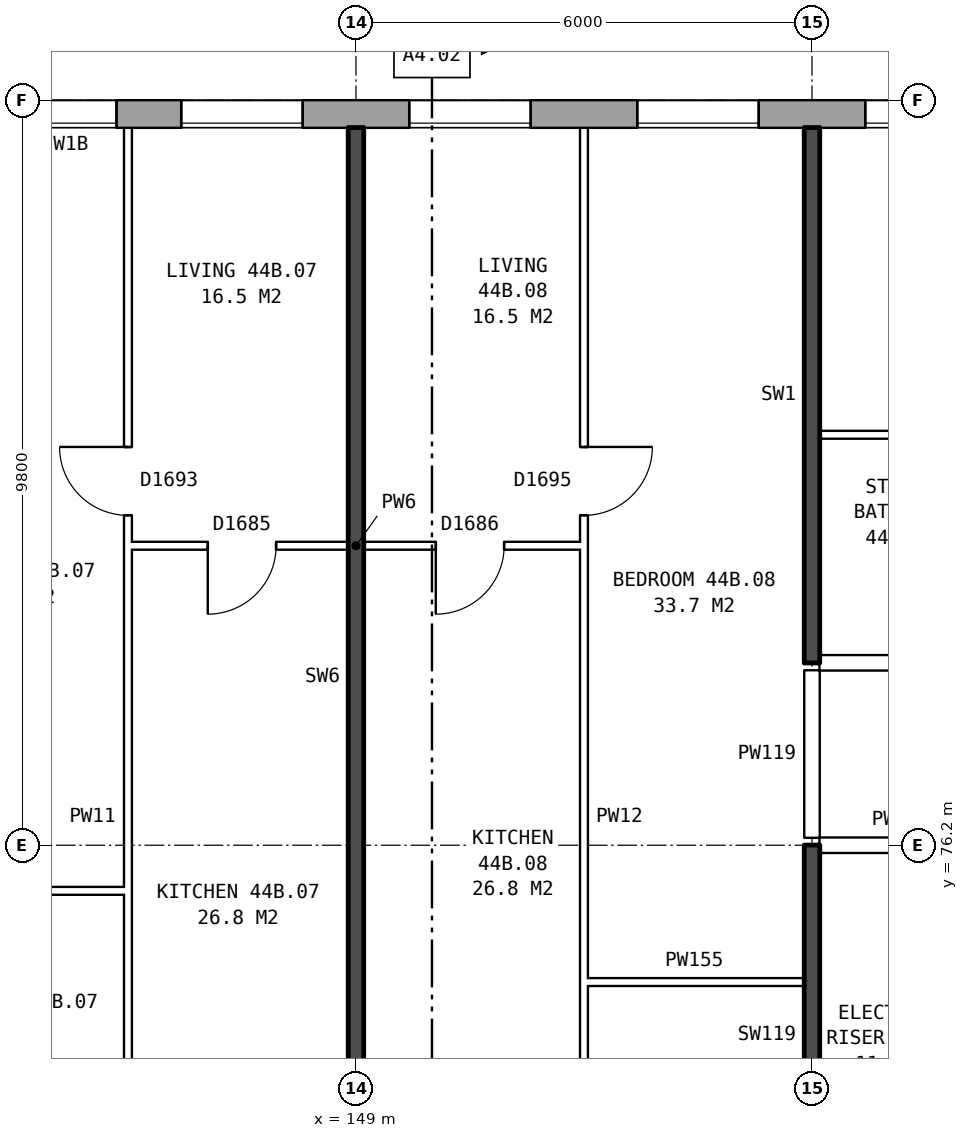
"""IFC4 building model, lengths in metres.
Left out: names, types, materials, properties, quantities, classifications, styles, units other than length and angle.
Written with IfcOpenShell. Run it as: python <this file> out.ifc"""

import sys

from ifc_helpers import new_model, si_unit, direction, frame, frame_2d, origin, place, context, subcontext, project, spatial, rectangle, extrude, element, fill, save


model = new_model("IFC4")
c1 = context("Model", 3, precision=1e-05, world=origin(), true_north=direction((0.0, 1.0)))
c2 = subcontext(c1, "Body", "Model", "MODEL_VIEW")
j1 = project(units=[si_unit("LENGTHUNIT", "METRE"), si_unit("PLANEANGLEUNIT", "RADIAN")], contexts=[c1])
p1 = place(None, origin())
s1 = spatial("IfcSite", under=j1, at=p1, CompositionType="ELEMENT")
p2 = place(p1, origin())
s2 = spatial("IfcBuilding", under=s1, at=p2, CompositionType="ELEMENT")
p3 = place(p2, frame((0.0, 0.0, 157.8)))
s3 = spatial("IfcBuildingStorey", under=s2, at=p3, CompositionType="ELEMENT", Elevation=157.8)
p4 = place(p3, frame((168.425, 85.82, 0.0), z_axis=(0.0, 0.0, 1.0), x_axis=(-1.0, 0.0, 0.0)))
e1 = element("IfcWall", 1, at=p4, inside=s3, PredefinedType="STANDARD", context=c2, shape_type="SweptSolid", body=[
    extrude(rectangle(XDim=34.351, YDim=0.36, at=frame_2d((17.175, 0.0))), origin(), (0.0, 0.0, 1.0), 2.85),
])
p5 = place(p4, frame((2.125, 0.0, 0.8)))
e2 = element("IfcOpeningElement", 2, at=p5, cuts=e1, PredefinedType="OPENING", context=c2, shape_type="SweptSolid", body=[
    extrude(rectangle(XDim=1.6, YDim=1.8, at=frame_2d((0.8, 0.9))), frame((0.0, 0.19, 0.0), z_axis=(0.0, -1.0, 0.0), x_axis=(1.0, 0.0, 0.0)), (0.0, 0.0, 1.0), 0.38),
])
p6 = place(p4, frame((5.125, 0.0, 0.8)))
e3 = element("IfcOpeningElement", 3, at=p6, cuts=e1, PredefinedType="OPENING", context=c2, shape_type="SweptSolid", body=[
    extrude(rectangle(XDim=1.6, YDim=1.8, at=frame_2d((0.8, 0.9))), frame((0.0, 0.19, 0.0), z_axis=(0.0, -1.0, 0.0), x_axis=(1.0, 0.0, 0.0)), (0.0, 0.0, 1.0), 0.38),
])
p7 = place(p4, frame((7.625, 0.0, 1.7)))
e4 = element("IfcOpeningElement", 4, at=p7, cuts=e1, PredefinedType="OPENING", context=c2, shape_type="SweptSolid", body=[
    extrude(rectangle(XDim=1.2, YDim=0.9, at=frame_2d((0.6, 0.45))), frame((0.0, 0.19, 0.0), z_axis=(0.0, -1.0, 0.0), x_axis=(1.0, 0.0, 0.0)), (0.0, 0.0, 1.0), 0.38),
])
p8 = place(p4, frame((11.125, 0.0, 0.8)))
e5 = element("IfcOpeningElement", 5, at=p8, cuts=e1, PredefinedType="OPENING", context=c2, shape_type="SweptSolid", body=[
    extrude(rectangle(XDim=1.6, YDim=1.8, at=frame_2d((0.8, 0.9))), frame((0.0, 0.19, 0.0), z_axis=(0.0, -1.0, 0.0), x_axis=(1.0, 0.0, 0.0)), (0.0, 0.0, 1.0), 0.38),
])
p9 = place(p4, frame((14.125, 0.0, 0.8)))
e6 = element("IfcOpeningElement", 6, at=p9, cuts=e1, PredefinedType="OPENING", context=c2, shape_type="SweptSolid", body=[
    extrude(rectangle(XDim=1.6, YDim=1.8, at=frame_2d((0.8, 0.9))), frame((0.0, 0.19, 0.0), z_axis=(0.0, -1.0, 0.0), x_axis=(1.0, 0.0, 0.0)), (0.0, 0.0, 1.0), 0.38),
])
p10 = place(p4, frame((17.125, 0.0, 0.8)))
e7 = element("IfcOpeningElement", 7, at=p10, cuts=e1, PredefinedType="OPENING", context=c2, shape_type="SweptSolid", body=[
    extrude(rectangle(XDim=1.6, YDim=1.8, at=frame_2d((0.8, 0.9))), frame((0.0, 0.19, 0.0), z_axis=(0.0, -1.0, 0.0), x_axis=(1.0, 0.0, 0.0)), (0.0, 0.0, 1.0), 0.38),
])
p11 = place(p4, frame((20.125, 0.0, 0.8)))
e8 = element("IfcOpeningElement", 8, at=p11, cuts=e1, PredefinedType="OPENING", context=c2, shape_type="SweptSolid", body=[
    extrude(rectangle(XDim=1.6, YDim=1.8, at=frame_2d((0.8, 0.9))), frame((0.0, 0.19, 0.0), z_axis=(0.0, -1.0, 0.0), x_axis=(1.0, 0.0, 0.0)), (0.0, 0.0, 1.0), 0.38),
])
p12 = place(p4, frame((22.575, 0.0, 0.45)))
e9 = element("IfcOpeningElement", 9, at=p12, cuts=e1, PredefinedType="OPENING", context=c2, shape_type="SweptSolid", body=[
    extrude(rectangle(XDim=1.2, YDim=1.8, at=frame_2d((0.6, 0.9))), frame((0.0, 0.19, 0.0), z_axis=(0.0, -1.0, 0.0), x_axis=(1.0, 0.0, 0.0)), (0.0, 0.0, 1.0), 0.38),
])
p13 = place(p4, frame((25.875, 0.0, 1.4)))
e10 = element("IfcOpeningElement", 10, at=p13, cuts=e1, PredefinedType="OPENING", context=c2, shape_type="SweptSolid", body=[
    extrude(rectangle(XDim=1.0, YDim=1.2, at=frame_2d((0.5, 0.6))), frame((0.0, 0.19, 0.0), z_axis=(0.0, -1.0, 0.0), x_axis=(1.0, 0.0, 0.0)), (0.0, 0.0, 1.0), 0.38),
])
p14 = place(p4, frame((29.125, 0.0, 0.8)))
e11 = element("IfcOpeningElement", 11, at=p14, cuts=e1, PredefinedType="OPENING", context=c2, shape_type="SweptSolid", body=[
    extrude(rectangle(XDim=1.6, YDim=1.8, at=frame_2d((0.8, 0.9))), frame((0.0, 0.19, 0.0), z_axis=(0.0, -1.0, 0.0), x_axis=(1.0, 0.0, 0.0)), (0.0, 0.0, 1.0), 0.38),
])
p15 = place(p4, frame((32.125, 0.0, 0.8)))
e12 = element("IfcOpeningElement", 12, at=p15, cuts=e1, PredefinedType="OPENING", context=c2, shape_type="SweptSolid", body=[
    extrude(rectangle(XDim=1.6, YDim=1.8, at=frame_2d((0.8, 0.9))), frame((0.0, 0.19, 0.0), z_axis=(0.0, -1.0, 0.0), x_axis=(1.0, 0.0, 0.0)), (0.0, 0.0, 1.0), 0.38),
])
p16 = place(p4, frame((9.975, 0.0, 0.8)))
e13 = element("IfcOpeningElement", 13, at=p16, cuts=e1, PredefinedType="OPENING", context=c2, shape_type="SweptSolid", body=[
    extrude(rectangle(XDim=0.8, YDim=0.9, at=frame_2d((0.4, 0.45))), frame((0.0, 0.19, 0.0), z_axis=(0.0, -1.0, 0.0), x_axis=(1.0, 0.0, 0.0)), (0.0, 0.0, 1.0), 0.38),
])
p17 = place(p4, frame((24.075, 0.0, 0.35)))
e14 = element("IfcOpeningElement", 14, at=p17, cuts=e1, PredefinedType="OPENING", context=c2, shape_type="SweptSolid", body=[
    extrude(rectangle(XDim=0.8, YDim=0.9, at=frame_2d((0.4, 0.45))), frame((0.0, 0.19, 0.0), z_axis=(0.0, -1.0, 0.0), x_axis=(1.0, 0.0, 0.0)), (0.0, 0.0, 1.0), 0.38),
])
p18 = place(p4, frame((27.175, 0.0, 0.8)))
e15 = element("IfcOpeningElement", 15, at=p18, cuts=e1, PredefinedType="OPENING", context=c2, shape_type="SweptSolid", body=[
    extrude(rectangle(XDim=1.4, YDim=1.8, at=frame_2d((0.7, 0.9))), frame((0.0, 0.19, 0.0), z_axis=(0.0, -1.0, 0.0), x_axis=(1.0, 0.0, 0.0)), (0.0, 0.0, 1.0), 0.38),
])
p19 = place(p3, frame((152.0, 74.4, 0.0), z_axis=(0.0, 0.0, 1.0), x_axis=(1.0, 0.0, 0.0)))
e16 = element("IfcWall", 16, at=p19, inside=s3, PredefinedType="PARTITIONING", context=c2, shape_type="SweptSolid", body=[
    extrude(rectangle(XDim=2.9, YDim=0.1, at=frame_2d((1.45, 0.0))), origin(), (0.0, 0.0, 1.0), 2.85),
])
p20 = place(p3, frame((142.76, 75.6, 0.0), z_axis=(0.0, 0.0, 1.0), x_axis=(1.0, 0.0, 0.0)))
e17 = element("IfcWall", 17, at=p20, inside=s3, PredefinedType="PARTITIONING", context=c2, shape_type="SweptSolid", body=[
    extrude(rectangle(XDim=3.24, YDim=0.1, at=frame_2d((1.62, 0.0))), origin(), (0.0, 0.0, 1.0), 2.85),
])
p21 = place(p3, frame((155.1, 76.2, 0.0), z_axis=(0.0, 0.0, 1.0), x_axis=(1.0, 0.0, 0.0)))
e18 = element("IfcWall", 18, at=p21, inside=s3, PredefinedType="PARTITIONING", context=c2, shape_type="SweptSolid", body=[
    extrude(rectangle(XDim=2.14, YDim=0.2, at=frame_2d((1.07, 0.0))), origin(), (0.0, 0.0, 1.0), 2.85),
])
p22 = place(p3, frame((155.1, 78.6, 0.0), z_axis=(0.0, 0.0, 1.0), x_axis=(1.0, 0.0, 0.0)))
e19 = element("IfcWall", 19, at=p22, inside=s3, PredefinedType="PARTITIONING", context=c2, shape_type="SweptSolid", body=[
    extrude(rectangle(XDim=16.04, YDim=0.2, at=frame_2d((8.02, 0.0))), origin(), (0.0, 0.0, 1.0), 2.85),
])
p23 = place(p22, frame((3.6, 0.0, 0.0)))
e20 = element("IfcOpeningElement", 20, at=p23, cuts=e19, PredefinedType="OPENING", context=c2, shape_type="SweptSolid", body=[
    extrude(rectangle(XDim=1.0, YDim=2.1, at=frame_2d((0.5, 1.05))), frame((0.0, 0.11, 0.0), z_axis=(0.0, -1.0, 0.0), x_axis=(1.0, 0.0, 0.0)), (0.0, 0.0, 1.0), 0.22),
])
p24 = place(p22, frame((8.4, 0.0, 0.0)))
e21 = element("IfcOpeningElement", 21, at=p24, cuts=e19, PredefinedType="OPENING", context=c2, shape_type="SweptSolid", body=[
    extrude(rectangle(XDim=1.0, YDim=2.1, at=frame_2d((0.5, 1.05))), frame((0.0, 0.11, 0.0), z_axis=(0.0, -1.0, 0.0), x_axis=(1.0, 0.0, 0.0)), (0.0, 0.0, 1.0), 0.22),
])
p25 = place(p3, frame((146.0, 80.14, 0.0), z_axis=(0.0, 0.0, 1.0), x_axis=(1.0, 0.0, 0.0)))
e22 = element("IfcWall", 22, at=p25, inside=s3, PredefinedType="PARTITIONING", context=c2, shape_type="SweptSolid", body=[
    extrude(rectangle(XDim=6.0, YDim=0.1, at=frame_2d((3.0, 0.0))), origin(), (0.0, 0.0, 1.0), 2.85),
])
p26 = place(p25, frame((1.05, 0.0, 0.0)))
e23 = element("IfcOpeningElement", 23, at=p26, cuts=e22, PredefinedType="OPENING", context=c2, shape_type="SweptSolid", body=[
    extrude(rectangle(XDim=0.9, YDim=2.1, at=frame_2d((0.45, 1.05))), frame((0.0, 0.06, 0.0), z_axis=(0.0, -1.0, 0.0), x_axis=(1.0, 0.0, 0.0)), (0.0, 0.0, 1.0), 0.12),
])
p27 = place(p25, frame((4.05, 0.0, 0.0)))
e24 = element("IfcOpeningElement", 24, at=p27, cuts=e22, PredefinedType="OPENING", context=c2, shape_type="SweptSolid", body=[
    extrude(rectangle(XDim=0.9, YDim=2.1, at=frame_2d((0.45, 1.05))), frame((0.0, 0.06, 0.0), z_axis=(0.0, -1.0, 0.0), x_axis=(1.0, 0.0, 0.0)), (0.0, 0.0, 1.0), 0.12),
])
p28 = place(p3, frame((155.1, 81.6, 0.0), z_axis=(0.0, 0.0, 1.0), x_axis=(1.0, 0.0, 0.0)))
e25 = element("IfcWall", 25, at=p28, inside=s3, PredefinedType="PARTITIONING", context=c2, shape_type="SweptSolid", body=[
    extrude(rectangle(XDim=2.3, YDim=0.1, at=frame_2d((1.15, 0.0))), origin(), (0.0, 0.0, 1.0), 2.85),
])
p29 = place(p3, frame((146.0, 71.3, 0.0), z_axis=(0.0, 0.0, 1.0), x_axis=(0.0, 1.0, 0.0)))
e26 = element("IfcWall", 26, at=p29, inside=s3, PredefinedType="PARTITIONING", context=c2, shape_type="SweptSolid", body=[
    extrude(rectangle(XDim=14.34, YDim=0.1, at=frame_2d((7.17, 0.0))), origin(), (0.0, 0.0, 1.0), 2.85),
])
p30 = place(p29, frame((9.24, 0.0, 0.0)))
e27 = element("IfcOpeningElement", 27, at=p30, cuts=e26, PredefinedType="OPENING", context=c2, shape_type="SweptSolid", body=[
    extrude(rectangle(XDim=0.9, YDim=2.1, at=frame_2d((0.45, 1.05))), frame((0.0, 0.06, 0.0), z_axis=(0.0, -1.0, 0.0), x_axis=(1.0, 0.0, 0.0)), (0.0, 0.0, 1.0), 0.12),
])
p31 = place(p29, frame((0.4, 0.0, 0.0)))
e28 = element("IfcOpeningElement", 28, at=p31, cuts=e26, PredefinedType="OPENING", context=c2, shape_type="SweptSolid", body=[
    extrude(rectangle(XDim=0.9, YDim=2.1, at=frame_2d((0.45, 1.05))), frame((0.0, 0.06, 0.0), z_axis=(0.0, -1.0, 0.0), x_axis=(1.0, 0.0, 0.0)), (0.0, 0.0, 1.0), 0.12),
])
p32 = place(p3, frame((149.0, 71.2, 0.0), z_axis=(0.0, 0.0, 1.0), x_axis=(0.0, 1.0, 0.0)))
e29 = element("IfcWall", 29, at=p32, inside=s3, PredefinedType="SOLIDWALL", context=c2, shape_type="SweptSolid", body=[
    extrude(rectangle(XDim=14.44, YDim=0.2, at=frame_2d((7.22, 0.0))), origin(), (0.0, 0.0, 1.0), 2.85),
])
p33 = place(p3, frame((152.0, 71.3, 0.0), z_axis=(0.0, 0.0, 1.0), x_axis=(0.0, 1.0, 0.0)))
e30 = element("IfcWall", 30, at=p33, inside=s3, PredefinedType="PARTITIONING", context=c2, shape_type="SweptSolid", body=[
    extrude(rectangle(XDim=14.34, YDim=0.1, at=frame_2d((7.17, 0.0))), origin(), (0.0, 0.0, 1.0), 2.85),
])
p34 = place(p33, frame((9.24, 0.0, 0.0)))
e31 = element("IfcOpeningElement", 31, at=p34, cuts=e30, PredefinedType="OPENING", context=c2, shape_type="SweptSolid", body=[
    extrude(rectangle(XDim=0.9, YDim=2.1, at=frame_2d((0.45, 1.05))), frame((0.0, 0.06, 0.0), z_axis=(0.0, -1.0, 0.0), x_axis=(1.0, 0.0, 0.0)), (0.0, 0.0, 1.0), 0.12),
])
p35 = place(p33, frame((0.4, 0.0, 0.0)))
e32 = element("IfcOpeningElement", 32, at=p35, cuts=e30, PredefinedType="OPENING", context=c2, shape_type="SweptSolid", body=[
    extrude(rectangle(XDim=0.9, YDim=2.1, at=frame_2d((0.45, 1.05))), frame((0.0, 0.06, 0.0), z_axis=(0.0, -1.0, 0.0), x_axis=(1.0, 0.0, 0.0)), (0.0, 0.0, 1.0), 0.12),
])
p36 = place(p3, frame((155.0, 71.2, 0.0), z_axis=(0.0, 0.0, 1.0), x_axis=(0.0, 1.0, 0.0)))
e33 = element("IfcWall", 33, at=p36, inside=s3, PredefinedType="SOLIDWALL", context=c2, shape_type="SweptSolid", body=[
    extrude(rectangle(XDim=5.0, YDim=0.2, at=frame_2d((2.5, 0.0))), origin(), (0.0, 0.0, 1.0), 2.85),
])
p37 = place(p3, frame((155.0, 76.3, 0.0), z_axis=(0.0, 0.0, 1.0), x_axis=(0.0, 1.0, 0.0)))
e34 = element("IfcWall", 34, at=p37, inside=s3, PredefinedType="PARTITIONING", context=c2, shape_type="SweptSolid", body=[
    extrude(rectangle(XDim=2.2, YDim=0.2, at=frame_2d((1.1, 0.0))), origin(), (0.0, 0.0, 1.0), 2.85),
])
p38 = place(p3, frame((155.0, 78.6, 0.0), z_axis=(0.0, 0.0, 1.0), x_axis=(0.0, 1.0, 0.0)))
e35 = element("IfcWall", 35, at=p38, inside=s3, PredefinedType="SOLIDWALL", context=c2, shape_type="SweptSolid", body=[
    extrude(rectangle(XDim=7.04, YDim=0.2, at=frame_2d((3.52, 0.0))), origin(), (0.0, 0.0, 1.0), 2.85),
])
p39 = place(p8, origin())
e36 = element("IfcWindow", 36, at=p39, inside=s3, PartitioningType="SINGLE_PANEL", PredefinedType="WINDOW", context=c2, shape_type="SweptSolid", body=[
    extrude(rectangle(XDim=1.6, YDim=1.8, at=frame_2d((0.8, 0.9))), frame((0.0, 0.15, 0.0), z_axis=(0.0, -1.0, 0.0), x_axis=(1.0, 0.0, 0.0)), (0.0, 0.0, 1.0), 0.06),
])
fill(e5, e36)
p40 = place(p9, origin())
e37 = element("IfcWindow", 37, at=p40, inside=s3, PartitioningType="SINGLE_PANEL", PredefinedType="WINDOW", context=c2, shape_type="SweptSolid", body=[
    extrude(rectangle(XDim=1.6, YDim=1.8, at=frame_2d((0.8, 0.9))), frame((0.0, 0.15, 0.0), z_axis=(0.0, -1.0, 0.0), x_axis=(1.0, 0.0, 0.0)), (0.0, 0.0, 1.0), 0.06),
])
fill(e6, e37)
p41 = place(p10, origin())
e38 = element("IfcWindow", 38, at=p41, inside=s3, PartitioningType="SINGLE_PANEL", PredefinedType="WINDOW", context=c2, shape_type="SweptSolid", body=[
    extrude(rectangle(XDim=1.6, YDim=1.8, at=frame_2d((0.8, 0.9))), frame((0.0, 0.15, 0.0), z_axis=(0.0, -1.0, 0.0), x_axis=(1.0, 0.0, 0.0)), (0.0, 0.0, 1.0), 0.06),
])
fill(e7, e38)
p42 = place(p11, origin())
e39 = element("IfcWindow", 39, at=p42, inside=s3, PartitioningType="SINGLE_PANEL", PredefinedType="WINDOW", context=c2, shape_type="SweptSolid", body=[
    extrude(rectangle(XDim=1.6, YDim=1.8, at=frame_2d((0.8, 0.9))), frame((0.0, 0.15, 0.0), z_axis=(0.0, -1.0, 0.0), x_axis=(1.0, 0.0, 0.0)), (0.0, 0.0, 1.0), 0.06),
])
fill(e8, e39)
p43 = place(p12, origin())
e40 = element("IfcWindow", 40, at=p43, inside=s3, PartitioningType="SINGLE_PANEL", PredefinedType="WINDOW", context=c2, shape_type="SweptSolid", body=[
    extrude(rectangle(XDim=1.2, YDim=1.8, at=frame_2d((0.6, 0.9))), frame((0.0, 0.15, 0.0), z_axis=(0.0, -1.0, 0.0), x_axis=(1.0, 0.0, 0.0)), (0.0, 0.0, 1.0), 0.06),
])
fill(e9, e40)
p44 = place(p30, origin())
e41 = element("IfcDoor", 41, at=p44, inside=s3, OperationType="SINGLE_SWING_RIGHT", PredefinedType="DOOR", context=c2, shape_type="SweptSolid", body=[
    extrude(rectangle(XDim=0.9, YDim=2.1, at=frame_2d((0.45, 1.05))), frame((0.0, 0.025, 0.0), z_axis=(0.0, -1.0, 0.0), x_axis=(1.0, 0.0, 0.0)), (0.0, 0.0, 1.0), 0.05),
])
fill(e27, e41)
p45 = place(p26, frame((0.9, 0.0, 0.0), z_axis=(0.0, 0.0, 1.0), x_axis=(-1.0, 0.0, 0.0)))
e42 = element("IfcDoor", 42, at=p45, inside=s3, OperationType="SINGLE_SWING_RIGHT", PredefinedType="DOOR", context=c2, shape_type="SweptSolid", body=[
    extrude(rectangle(XDim=0.9, YDim=2.1, at=frame_2d((0.45, 1.05))), frame((0.0, 0.025, 0.0), z_axis=(0.0, -1.0, 0.0), x_axis=(1.0, 0.0, 0.0)), (0.0, 0.0, 1.0), 0.05),
])
fill(e23, e42)
p46 = place(p34, frame((0.9, 0.0, 0.0), z_axis=(0.0, 0.0, 1.0), x_axis=(-1.0, 0.0, 0.0)))
e43 = element("IfcDoor", 43, at=p46, inside=s3, OperationType="SINGLE_SWING_LEFT", PredefinedType="DOOR", context=c2, shape_type="SweptSolid", body=[
    extrude(rectangle(XDim=0.9, YDim=2.1, at=frame_2d((0.45, 1.05))), frame((0.0, 0.025, 0.0), z_axis=(0.0, -1.0, 0.0), x_axis=(1.0, 0.0, 0.0)), (0.0, 0.0, 1.0), 0.05),
])
fill(e31, e43)
p47 = place(p27, frame((0.9, 0.0, 0.0), z_axis=(0.0, 0.0, 1.0), x_axis=(-1.0, 0.0, 0.0)))
e44 = element("IfcDoor", 44, at=p47, inside=s3, OperationType="SINGLE_SWING_RIGHT", PredefinedType="DOOR", context=c2, shape_type="SweptSolid", body=[
    extrude(rectangle(XDim=0.9, YDim=2.1, at=frame_2d((0.45, 1.05))), frame((0.0, 0.025, 0.0), z_axis=(0.0, -1.0, 0.0), x_axis=(1.0, 0.0, 0.0)), (0.0, 0.0, 1.0), 0.05),
])
fill(e24, e44)
save(model, sys.argv[1])
